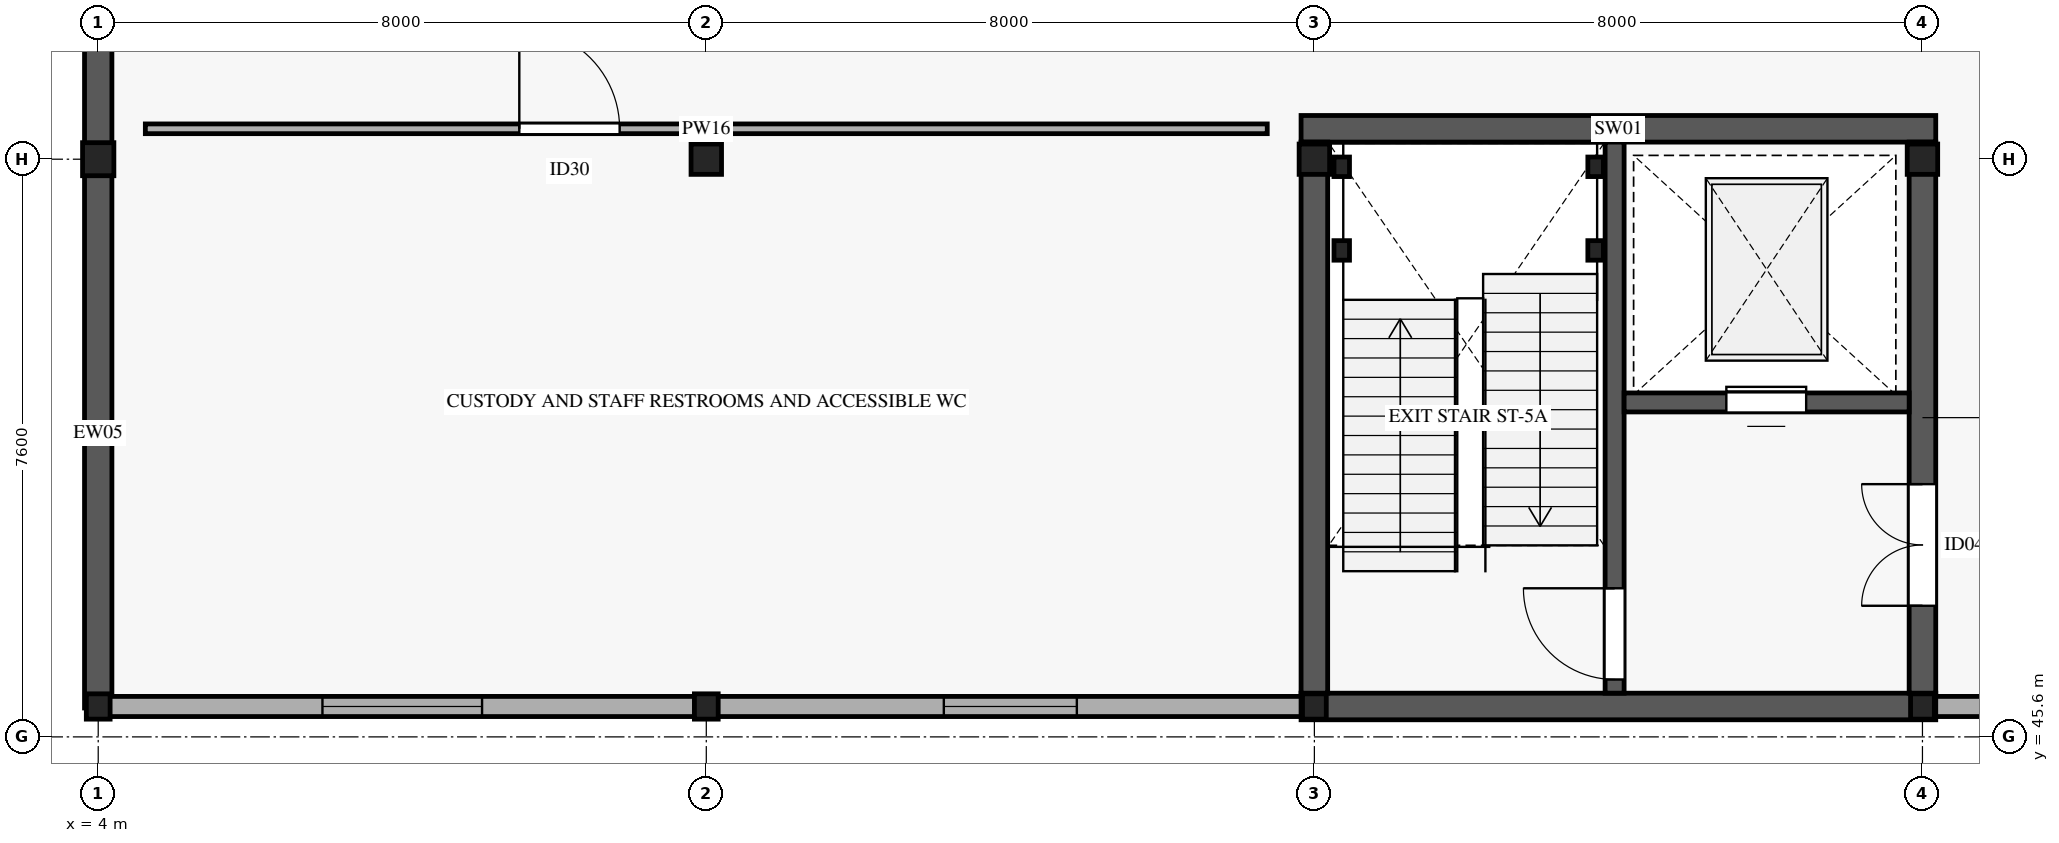
"""IFC4 building model, lengths in metres.
Left out: names, types, materials, properties, quantities, classifications, styles, units other than length and angle.
Written with IfcOpenShell. Run it as: python <this file> out.ifc"""

import sys

from ifc_helpers import new_model, si_unit, direction, frame, frame_2d, origin, origin_2d, place, context, subcontext, project, spatial, rectangle, i_section, extrude, element, fill, save


model = new_model("IFC4")
c1 = context("Model", 3, precision=1e-05, world=origin(), true_north=direction((0.0, 1.0)))
c2 = subcontext(c1, "Body", "Model", "MODEL_VIEW")
j1 = project(units=[si_unit("LENGTHUNIT", "METRE"), si_unit("PLANEANGLEUNIT", "RADIAN")], contexts=[c1])
p1 = place(None, origin())
s1 = spatial("IfcSite", under=j1, at=p1, CompositionType="ELEMENT")
p2 = place(p1, origin())
s2 = spatial("IfcBuilding", under=s1, at=p2, CompositionType="ELEMENT")
p3 = place(p2, origin())
s3 = spatial("IfcBuildingStorey", under=s2, at=p3, CompositionType="ELEMENT", Elevation=0.0)
p4 = place(p3, frame((4.0, 46.0, 0.0), z_axis=(0.0, 0.0, 1.0), x_axis=(1.0, 0.0, 0.0)))
e1 = element("IfcColumn", 1, at=p4, inside=s3, PredefinedType="COLUMN", context=c2, shape_type="SweptSolid", body=[
    extrude(i_section(OverallWidth=0.313, OverallDepth=0.333, WebThickness=0.018, FlangeThickness=0.028, FilletRadius=0.015, at=origin_2d()), origin(), (0.0, 0.0, 1.0), 5.185),
])
p5 = place(p3, frame((4.0, 53.2, 0.0), z_axis=(0.0, 0.0, 1.0), x_axis=(1.0, 0.0, 0.0)))
e2 = element("IfcColumn", 2, at=p5, inside=s3, PredefinedType="COLUMN", context=c2, shape_type="SweptSolid", body=[
    extrude(i_section(OverallWidth=0.412, OverallDepth=0.435, WebThickness=0.036, FlangeThickness=0.057, FilletRadius=0.015, at=origin_2d()), origin(), (0.0, 0.0, 1.0), 5.185),
])
p6 = place(p3, frame((12.0, 46.0, 0.0), z_axis=(0.0, 0.0, 1.0), x_axis=(1.0, 0.0, 0.0)))
e3 = element("IfcColumn", 3, at=p6, inside=s3, PredefinedType="COLUMN", context=c2, shape_type="SweptSolid", body=[
    extrude(i_section(OverallWidth=0.313, OverallDepth=0.333, WebThickness=0.018, FlangeThickness=0.028, FilletRadius=0.015, at=origin_2d()), origin(), (0.0, 0.0, 1.0), 5.185),
])
p7 = place(p3, frame((12.0, 53.2, 0.0), z_axis=(0.0, 0.0, 1.0), x_axis=(1.0, 0.0, 0.0)))
e4 = element("IfcColumn", 4, at=p7, inside=s3, PredefinedType="COLUMN", context=c2, shape_type="SweptSolid", body=[
    extrude(i_section(OverallWidth=0.401, OverallDepth=0.399, WebThickness=0.025, FlangeThickness=0.04, FilletRadius=0.015, at=origin_2d()), origin(), (0.0, 0.0, 1.0), 5.185),
])
p8 = place(p3, frame((20.0, 46.0, 0.0), z_axis=(0.0, 0.0, 1.0), x_axis=(1.0, 0.0, 0.0)))
e5 = element("IfcColumn", 5, at=p8, inside=s3, PredefinedType="COLUMN", context=c2, shape_type="SweptSolid", body=[
    extrude(i_section(OverallWidth=0.313, OverallDepth=0.333, WebThickness=0.018, FlangeThickness=0.028, FilletRadius=0.015, at=origin_2d()), origin(), (0.0, 0.0, 1.0), 5.185),
])
p9 = place(p3, frame((20.0, 53.2, 0.0), z_axis=(0.0, 0.0, 1.0), x_axis=(1.0, 0.0, 0.0)))
e6 = element("IfcColumn", 6, at=p9, inside=s3, PredefinedType="COLUMN", context=c2, shape_type="SweptSolid", body=[
    extrude(i_section(OverallWidth=0.401, OverallDepth=0.399, WebThickness=0.025, FlangeThickness=0.04, FilletRadius=0.015, at=origin_2d()), origin(), (0.0, 0.0, 1.0), 5.185),
])
p10 = place(p3, frame((28.0, 46.0, 0.0), z_axis=(0.0, 0.0, 1.0), x_axis=(1.0, 0.0, 0.0)))
e7 = element("IfcColumn", 7, at=p10, inside=s3, PredefinedType="COLUMN", context=c2, shape_type="SweptSolid", body=[
    extrude(i_section(OverallWidth=0.313, OverallDepth=0.333, WebThickness=0.018, FlangeThickness=0.028, FilletRadius=0.015, at=origin_2d()), origin(), (0.0, 0.0, 1.0), 5.185),
])
p11 = place(p3, frame((28.0, 53.2, 0.0), z_axis=(0.0, 0.0, 1.0), x_axis=(1.0, 0.0, 0.0)))
e8 = element("IfcColumn", 8, at=p11, inside=s3, PredefinedType="COLUMN", context=c2, shape_type="SweptSolid", body=[
    extrude(i_section(OverallWidth=0.401, OverallDepth=0.399, WebThickness=0.025, FlangeThickness=0.04, FilletRadius=0.015, at=origin_2d()), origin(), (0.0, 0.0, 1.0), 5.185),
])
p12 = place(p3, frame((4.0, 45.98, 0.0), z_axis=(0.0, 0.0, 1.0), x_axis=(0.0, 1.0, 0.0)))
e9 = element("IfcWall", 9, at=p12, inside=s3, PredefinedType="STANDARD", context=c2, shape_type="SweptSolid", body=[
    extrude(rectangle(XDim=7.24, YDim=0.36, at=frame_2d((3.62, 0.0))), origin(), (0.0, 0.0, 1.0), 5.19),
])
p13 = place(p3, frame((4.0, 53.18, 0.0), z_axis=(0.0, 0.0, 1.0), x_axis=(0.0, 1.0, 0.0)))
e10 = element("IfcWall", 10, at=p13, inside=s3, PredefinedType="STANDARD", context=c2, shape_type="SweptSolid", body=[
    extrude(rectangle(XDim=8.04, YDim=0.36, at=frame_2d((4.02, 0.0))), origin(), (0.0, 0.0, 1.0), 5.19),
])
p14 = place(p3, frame((36.02, 46.0, 0.0), z_axis=(0.0, 0.0, 1.0), x_axis=(-1.0, 0.0, 0.0)))
e11 = element("IfcWall", 11, at=p14, inside=s3, PredefinedType="STANDARD", context=c2, shape_type="SweptSolid", body=[
    extrude(rectangle(XDim=8.04, YDim=0.265, at=frame_2d((4.02, 0.0))), origin(), (0.0, 0.0, 1.0), 4.25),
])
p15 = place(p14, frame((3.32, 0.0, 0.75)))
e12 = element("IfcOpeningElement", 12, at=p15, cuts=e11, PredefinedType="OPENING", context=c2, shape_type="SweptSolid", body=[
    extrude(rectangle(XDim=1.4, YDim=1.65, at=frame_2d((0.7, 0.825))), frame((0.0, 0.142, 0.0), z_axis=(0.0, -1.0, 0.0), x_axis=(1.0, 0.0, 0.0)), (0.0, 0.0, 1.0), 0.285),
])
p16 = place(p3, frame((20.02, 46.0, 0.0), z_axis=(0.0, 0.0, 1.0), x_axis=(-1.0, 0.0, 0.0)))
e13 = element("IfcWall", 13, at=p16, inside=s3, PredefinedType="STANDARD", context=c2, shape_type="SweptSolid", body=[
    extrude(rectangle(XDim=8.04, YDim=0.265, at=frame_2d((4.02, 0.0))), origin(), (0.0, 0.0, 1.0), 4.25),
])
p17 = place(p16, frame((3.145, 0.0, 0.75)))
e14 = element("IfcOpeningElement", 14, at=p17, cuts=e13, PredefinedType="OPENING", context=c2, shape_type="SweptSolid", body=[
    extrude(rectangle(XDim=1.75, YDim=1.65, at=frame_2d((0.875, 0.825))), frame((0.0, 0.142, 0.0), z_axis=(0.0, -1.0, 0.0), x_axis=(1.0, 0.0, 0.0)), (0.0, 0.0, 1.0), 0.285),
])
p18 = place(p3, frame((12.02, 46.0, 0.0), z_axis=(0.0, 0.0, 1.0), x_axis=(-1.0, 0.0, 0.0)))
e15 = element("IfcWall", 15, at=p18, inside=s3, PredefinedType="STANDARD", context=c2, shape_type="SweptSolid", body=[
    extrude(rectangle(XDim=8.04, YDim=0.265, at=frame_2d((4.02, 0.0))), origin(), (0.0, 0.0, 1.0), 4.25),
])
p19 = place(p18, frame((2.97, 0.0, 0.75)))
e16 = element("IfcOpeningElement", 16, at=p19, cuts=e15, PredefinedType="OPENING", context=c2, shape_type="SweptSolid", body=[
    extrude(rectangle(XDim=2.1, YDim=1.65, at=frame_2d((1.05, 0.825))), frame((0.0, 0.142, 0.0), z_axis=(0.0, -1.0, 0.0), x_axis=(1.0, 0.0, 0.0)), (0.0, 0.0, 1.0), 0.285),
])
for number, where, z_axis, x_axis in (
    (17, (19.825, 46.0, 0.0), (0.0, 0.0, 1.0), (1.0, 0.0, 0.0)),
    (18, (19.825, 53.6, 0.0), (0.0, 0.0, 1.0), (1.0, 0.0, 0.0)),
):
    element("IfcWall", number, at=place(p3, frame(where, z_axis=z_axis, x_axis=x_axis)), inside=s3, PredefinedType="SHEAR", context=c2, shape_type="SweptSolid", body=[
        extrude(rectangle(XDim=8.35, YDim=0.35, at=frame_2d((4.175, 0.0))), origin(), (0.0, 0.0, 1.0), 5.19),
    ])
p20 = place(p3, frame((20.0, 46.175, 0.0), z_axis=(0.0, 0.0, 1.0), x_axis=(0.0, 1.0, 0.0)))
e19 = element("IfcWall", 19, at=p20, inside=s3, PredefinedType="SHEAR", context=c2, shape_type="SweptSolid", body=[
    extrude(rectangle(XDim=7.25, YDim=0.35, at=frame_2d((3.625, 0.0))), origin(), (0.0, 0.0, 1.0), 5.19),
])
p21 = place(p3, frame((28.0, 46.175, 0.0), z_axis=(0.0, 0.0, 1.0), x_axis=(0.0, 1.0, 0.0)))
e20 = element("IfcWall", 20, at=p21, inside=s3, PredefinedType="SHEAR", context=c2, shape_type="SweptSolid", body=[
    extrude(rectangle(XDim=7.25, YDim=0.35, at=frame_2d((3.625, 0.0))), origin(), (0.0, 0.0, 1.0), 5.19),
])
p22 = place(p21, frame((1.15, 0.0, 0.0)))
e21 = element("IfcOpeningElement", 21, at=p22, cuts=e20, PredefinedType="OPENING", context=c2, shape_type="SweptSolid", body=[
    extrude(rectangle(XDim=1.6, YDim=2.35, at=frame_2d((0.8, 1.175))), frame((0.0, 0.185, 0.0), z_axis=(0.0, -1.0, 0.0), x_axis=(1.0, 0.0, 0.0)), (0.0, 0.0, 1.0), 0.37),
])
p23 = place(p3, frame((23.95, 46.175, 0.0), z_axis=(0.0, 0.0, 1.0), x_axis=(0.0, 1.0, 0.0)))
e22 = element("IfcWall", 22, at=p23, inside=s3, PredefinedType="SHEAR", context=c2, shape_type="SweptSolid", body=[
    extrude(rectangle(XDim=7.25, YDim=0.25, at=frame_2d((3.625, 0.0))), origin(), (0.0, 0.0, 1.0), 5.19),
])
p24 = place(p23, frame((0.18, 0.0, 0.0)))
e23 = element("IfcOpeningElement", 23, at=p24, cuts=e22, PredefinedType="OPENING", context=c2, shape_type="SweptSolid", body=[
    extrude(rectangle(XDim=1.2, YDim=2.2, at=frame_2d((0.6, 1.1))), frame((0.0, 0.135, 0.0), z_axis=(0.0, -1.0, 0.0), x_axis=(1.0, 0.0, 0.0)), (0.0, 0.0, 1.0), 0.27),
])
p25 = place(p3, frame((24.075, 50.0, 0.0), z_axis=(0.0, 0.0, 1.0), x_axis=(1.0, 0.0, 0.0)))
e24 = element("IfcWall", 24, at=p25, inside=s3, PredefinedType="SHEAR", context=c2, shape_type="SweptSolid", body=[
    extrude(rectangle(XDim=3.75, YDim=0.25, at=frame_2d((1.875, 0.0))), origin(), (0.0, 0.0, 1.0), 5.19),
])
p26 = place(p25, frame((1.345, 0.0, 0.0)))
e25 = element("IfcOpeningElement", 25, at=p26, cuts=e24, PredefinedType="OPENING", context=c2, shape_type="SweptSolid", body=[
    extrude(rectangle(XDim=1.05, YDim=2.2, at=frame_2d((0.525, 1.1))), frame((0.0, 0.135, 0.0), z_axis=(0.0, -1.0, 0.0), x_axis=(1.0, 0.0, 0.0)), (0.0, 0.0, 1.0), 0.27),
])
for number, where, z_axis, x_axis in (
    (26, (20.36, 52.0, 0.0), (0.0, 0.0, 1.0), (1.0, 0.0, 0.0)),
    (27, (23.7, 52.0, 0.0), (0.0, 0.0, 1.0), (1.0, 0.0, 0.0)),
    (28, (20.36, 53.1, 0.0), (0.0, 0.0, 1.0), (1.0, 0.0, 0.0)),
    (29, (23.7, 53.1, 0.0), (0.0, 0.0, 1.0), (1.0, 0.0, 0.0)),
):
    element("IfcColumn", number, at=place(p3, frame(where, z_axis=z_axis, x_axis=x_axis)), inside=s3, PredefinedType="COLUMN", context=c2, shape_type="SweptSolid", body=[
        extrude(i_section(OverallWidth=0.204, OverallDepth=0.257, WebThickness=0.009, FlangeThickness=0.016, FilletRadius=0.013, at=origin_2d()), origin(), (0.0, 0.0, 1.0), 5.395),
    ])
p27 = place(p3, frame((4.62, 53.6, 0.0), z_axis=(0.0, 0.0, 1.0), x_axis=(1.0, 0.0, 0.0)))
e30 = element("IfcWall", 30, at=p27, inside=s3, PredefinedType="PARTITIONING", context=c2, shape_type="SweptSolid", body=[
    extrude(rectangle(XDim=14.76, YDim=0.128, at=frame_2d((7.38, 0.0))), origin(), (0.0, 0.0, 1.0), 4.05),
])
p28 = place(p27, frame((4.92, 0.0, 0.0)))
e31 = element("IfcOpeningElement", 31, at=p28, cuts=e30, PredefinedType="OPENING", context=c2, shape_type="SweptSolid", body=[
    extrude(rectangle(XDim=1.32, YDim=2.3, at=frame_2d((0.66, 1.15))), frame((0.0, 0.074, 0.0), z_axis=(0.0, -1.0, 0.0), x_axis=(1.0, 0.0, 0.0)), (0.0, 0.0, 1.0), 0.148),
])
p29 = place(p17, origin())
e32 = element("IfcWindow", 32, at=p29, inside=s3, PartitioningType="SINGLE_PANEL", PredefinedType="WINDOW", context=c2, shape_type="SweptSolid", body=[
    extrude(rectangle(XDim=1.75, YDim=1.65, at=frame_2d((0.875, 0.825))), frame((0.0, 0.03, 0.0), z_axis=(0.0, -1.0, 0.0), x_axis=(1.0, 0.0, 0.0)), (0.0, 0.0, 1.0), 0.06),
])
fill(e14, e32)
p30 = place(p19, origin())
e33 = element("IfcWindow", 33, at=p30, inside=s3, PartitioningType="SINGLE_PANEL", PredefinedType="WINDOW", context=c2, shape_type="SweptSolid", body=[
    extrude(rectangle(XDim=2.1, YDim=1.65, at=frame_2d((1.05, 0.825))), frame((0.0, 0.03, 0.0), z_axis=(0.0, -1.0, 0.0), x_axis=(1.0, 0.0, 0.0)), (0.0, 0.0, 1.0), 0.06),
])
fill(e16, e33)
p31 = place(p24, origin())
e34 = element("IfcDoor", 34, at=p31, inside=s3, OperationType="SINGLE_SWING_RIGHT", PredefinedType="DOOR", context=c2, shape_type="SweptSolid", body=[
    extrude(rectangle(XDim=1.2, YDim=2.2, at=frame_2d((0.6, 1.1))), frame((0.0, 0.025, 0.0), z_axis=(0.0, -1.0, 0.0), x_axis=(1.0, 0.0, 0.0)), (0.0, 0.0, 1.0), 0.05),
])
fill(e23, e34)
p32 = place(p22, origin())
e35 = element("IfcDoor", 35, at=p32, inside=s3, OperationType="DOUBLE_DOOR_SINGLE_SWING", PredefinedType="DOOR", context=c2, shape_type="SweptSolid", body=[
    extrude(rectangle(XDim=1.6, YDim=2.35, at=frame_2d((0.8, 1.175))), frame((0.0, 0.025, 0.0), z_axis=(0.0, -1.0, 0.0), x_axis=(1.0, 0.0, 0.0)), (0.0, 0.0, 1.0), 0.05),
])
fill(e21, e35)
p33 = place(p26, origin())
e36 = element("IfcDoor", 36, at=p33, inside=s3, OperationType="SLIDING_TO_RIGHT", PredefinedType="DOOR", context=c2, shape_type="SweptSolid", body=[
    extrude(rectangle(XDim=1.05, YDim=2.2, at=frame_2d((0.525, 1.1))), frame((0.0, 0.025, 0.0), z_axis=(0.0, -1.0, 0.0), x_axis=(1.0, 0.0, 0.0)), (0.0, 0.0, 1.0), 0.05),
])
fill(e25, e36)
p34 = place(p28, origin())
e37 = element("IfcDoor", 37, at=p34, inside=s3, OperationType="SINGLE_SWING_LEFT", PredefinedType="DOOR", context=c2, shape_type="SweptSolid", body=[
    extrude(rectangle(XDim=1.32, YDim=2.3, at=frame_2d((0.66, 1.15))), frame((0.0, 0.025, 0.0), z_axis=(0.0, -1.0, 0.0), x_axis=(1.0, 0.0, 0.0)), (0.0, 0.0, 1.0), 0.05),
])
fill(e31, e37)
save(model, sys.argv[1])
